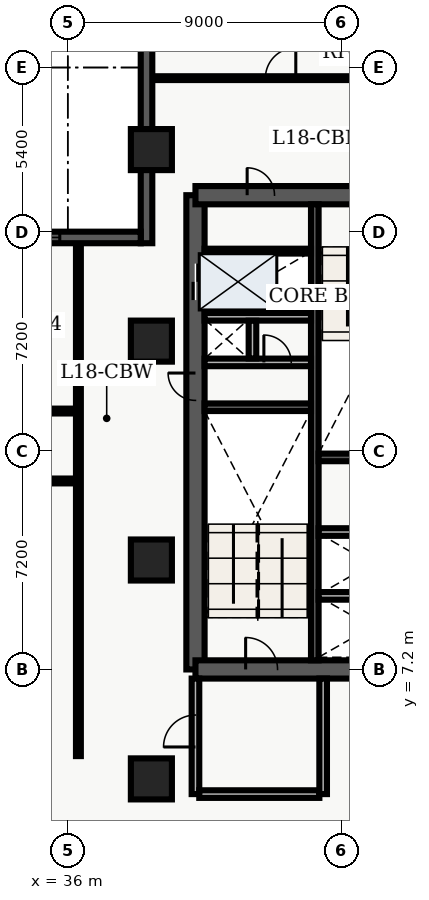
"""IFC4 building model, lengths in metres.
Left out: names, types, materials, properties, quantities, classifications, styles, units other than length and angle.
Written with IfcOpenShell. Run it as: python <this file> out.ifc"""

import sys

from ifc_helpers import new_model, entity, si_unit, converted_unit, direction, frame, origin_with_axes, origin_2d_with_axis, place, context, subcontext, project, spatial, polyline, rectangle, outline, extrude, element, fill, save


model = new_model("IFC4")
c1 = context("Model", 3, precision=1e-05, world=origin_with_axes(), true_north=direction((0.0, 1.0)))
c2 = subcontext(c1, "Body", "Model", "MODEL_VIEW")
j1 = project(units=[si_unit("LENGTHUNIT", "METRE"), converted_unit("PLANEANGLEUNIT", "DEGREE", entity("IfcPlaneAngleMeasure", 0.017), si_unit("PLANEANGLEUNIT", "RADIAN"), dimensions=[0, 0, 0, 0, 0, 0, 0])], contexts=[c1])
p1 = place(None, origin_with_axes())
s1 = spatial("IfcSite", under=j1, at=p1, CompositionType="ELEMENT")
p2 = place(p1, origin_with_axes())
s2 = spatial("IfcBuilding", under=s1, at=p2, CompositionType="ELEMENT")
p3 = place(p2, frame((0.0, 0.0, 75.6), z_axis=(0.0, 0.0, 1.0), x_axis=(1.0, 0.0, 0.0)))
s3 = spatial("IfcBuildingStorey", under=s2, at=p3, CompositionType="ELEMENT", Elevation=75.6)
p4 = place(p3, frame((40.2, 7.2, 0.0), z_axis=(0.0, 0.0, 1.0), x_axis=(0.0, 1.0, 0.0)))
e1 = element("IfcWall", 1, at=p4, inside=s3, PredefinedType="SHEAR", context=c2, shape_type="SweptSolid", body=[
    extrude(outline(polyline([(0.0, -0.3), (15.6, -0.3), (15.6, 0.3), (0.0, 0.3), (0.0, -0.3)])), origin_with_axes(), (0.0, 0.0, 1.0), 3.6),
])
p5 = place(p4, frame((12.75, 0.0, 0.0), z_axis=(0.0, 0.0, 1.0), x_axis=(1.0, 0.0, 0.0)))
e2 = element("IfcOpeningElement", 2, at=p5, cuts=e1, PredefinedType="OPENING", context=c2, shape_type="SweptSolid", body=[
    extrude(rectangle(XDim=1.2, YDim=0.62, at=origin_2d_with_axis()), origin_with_axes(), (0.0, 0.0, 1.0), 2.15),
])
p6 = place(p4, frame((9.3, 0.0, 0.0), z_axis=(0.0, 0.0, 1.0), x_axis=(1.0, 0.0, 0.0)))
e3 = element("IfcOpeningElement", 3, at=p6, cuts=e1, PredefinedType="OPENING", context=c2, shape_type="SweptSolid", body=[
    extrude(rectangle(XDim=0.9, YDim=0.62, at=origin_2d_with_axis()), origin_with_axes(), (0.0, 0.0, 1.0), 2.15),
])
p7 = place(p3, frame((40.2, 7.2, 0.0), z_axis=(0.0, 0.0, 1.0), x_axis=(1.0, 0.0, 0.0)))
e4 = element("IfcWall", 4, at=p7, inside=s3, PredefinedType="SHEAR", context=c2, shape_type="SweptSolid", body=[
    extrude(outline(polyline([(0.0, -0.3), (7.85, -0.3), (7.85, 0.3), (0.0, 0.3), (0.0, -0.3)])), origin_with_axes(), (0.0, 0.0, 1.0), 3.6),
])
p8 = place(p7, frame((2.175, 0.0, 0.0), z_axis=(0.0, 0.0, 1.0), x_axis=(1.0, 0.0, 0.0)))
e5 = element("IfcOpeningElement", 5, at=p8, cuts=e4, PredefinedType="OPENING", context=c2, shape_type="SweptSolid", body=[
    extrude(rectangle(XDim=1.05, YDim=0.62, at=origin_2d_with_axis()), origin_with_axes(), (0.0, 0.0, 1.0), 2.15),
])
p9 = place(p3, frame((40.2, 22.8, 0.0), z_axis=(0.0, 0.0, 1.0), x_axis=(1.0, 0.0, 0.0)))
e6 = element("IfcWall", 6, at=p9, inside=s3, PredefinedType="SHEAR", context=c2, shape_type="SweptSolid", body=[
    extrude(outline(polyline([(0.0, -0.3), (7.85, -0.3), (7.85, 0.3), (0.0, 0.3), (0.0, -0.3)])), origin_with_axes(), (0.0, 0.0, 1.0), 3.6),
])
p10 = place(p9, frame((5.775, 0.0, 0.0), z_axis=(0.0, 0.0, 1.0), x_axis=(1.0, 0.0, 0.0)))
e7 = element("IfcOpeningElement", 7, at=p10, cuts=e6, PredefinedType="OPENING", context=c2, shape_type="SweptSolid", body=[
    extrude(rectangle(XDim=1.05, YDim=0.62, at=origin_2d_with_axis()), origin_with_axes(), (0.0, 0.0, 1.0), 2.15),
])
p11 = place(p9, frame((2.15, 0.0, 0.0), z_axis=(0.0, 0.0, 1.0), x_axis=(1.0, 0.0, 0.0)))
e8 = element("IfcOpeningElement", 8, at=p11, cuts=e6, PredefinedType="OPENING", context=c2, shape_type="SweptSolid", body=[
    extrude(rectangle(XDim=0.9, YDim=0.62, at=origin_2d_with_axis()), origin_with_axes(), (0.0, 0.0, 1.0), 2.15),
])
p12 = place(p3, frame((44.125, 7.5, 0.0), z_axis=(0.0, 0.0, 1.0), x_axis=(0.0, 1.0, 0.0)))
e9 = element("IfcWall", 9, at=p12, inside=s3, PredefinedType="SHEAR", context=c2, shape_type="SweptSolid", body=[
    extrude(outline(polyline([(0.0, -0.125), (15.0, -0.125), (15.0, 0.125), (0.0, 0.125), (0.0, -0.125)])), origin_with_axes(), (0.0, 0.0, 1.0), 3.6),
])
for number, where, z_axis, x_axis in (
    (10, (40.5, 15.825, 0.0), (0.0, 0.0, 1.0), (1.0, 0.0, 0.0)),
    (11, (44.25, 14.175, 0.0), (0.0, 0.0, 1.0), (1.0, 0.0, 0.0)),
):
    element("IfcWall", number, at=place(p3, frame(where, z_axis=z_axis, x_axis=x_axis)), inside=s3, PredefinedType="SHEAR", context=c2, shape_type="SweptSolid", body=[
        extrude(outline(polyline([(0.0, -0.125), (3.5, -0.125), (3.5, 0.125), (0.0, 0.125), (0.0, -0.125)])), origin_with_axes(), (0.0, 0.0, 1.0), 3.6),
    ])
p13 = place(p3, frame((40.5, 17.3, 0.0), z_axis=(0.0, 0.0, 1.0), x_axis=(1.0, 0.0, 0.0)))
e12 = element("IfcWall", 12, at=p13, inside=s3, PredefinedType="SOLIDWALL", context=c2, shape_type="SweptSolid", body=[
    extrude(outline(polyline([(0.0, -0.125), (3.5, -0.125), (3.5, 0.125), (0.0, 0.125), (0.0, -0.125)])), origin_with_axes(), (0.0, 0.0, 1.0), 2.64),
])
p14 = place(p13, frame((2.4, 0.0, 0.0), z_axis=(0.0, 0.0, 1.0), x_axis=(1.0, 0.0, 0.0)))
e13 = element("IfcOpeningElement", 13, at=p14, cuts=e12, PredefinedType="OPENING", context=c2, shape_type="SweptSolid", body=[
    extrude(rectangle(XDim=0.9, YDim=0.27, at=origin_2d_with_axis()), origin_with_axes(), (0.0, 0.0, 1.0), 2.15),
])
p15 = place(p3, frame((40.5, 18.8, 0.0), z_axis=(0.0, 0.0, 1.0), x_axis=(1.0, 0.0, 0.0)))
e14 = element("IfcWall", 14, at=p15, inside=s3, PredefinedType="SOLIDWALL", context=c2, shape_type="SweptSolid", body=[
    extrude(outline(polyline([(0.0, -0.125), (3.5, -0.125), (3.5, 0.125), (0.0, 0.125), (0.0, -0.125)])), origin_with_axes(), (0.0, 0.0, 1.0), 2.64),
])
p16 = place(p3, frame((42.075, 17.43, 0.0), z_axis=(0.0, 0.0, 1.0), x_axis=(0.0, 1.0, 0.0)))
e15 = element("IfcWall", 15, at=p16, inside=s3, PredefinedType="SOLIDWALL", context=c2, shape_type="SweptSolid", body=[
    extrude(outline(polyline([(0.0, -0.125), (1.24, -0.125), (1.24, 0.125), (0.0, 0.125), (0.0, -0.125)])), origin_with_axes(), (0.0, 0.0, 1.0), 2.64),
])
p17 = place(p3, frame((40.2, 3.1, 0.0), z_axis=(0.0, 0.0, 1.0), x_axis=(0.0, 1.0, 0.0)))
e16 = element("IfcWall", 16, at=p17, inside=s3, PredefinedType="SOLIDWALL", context=c2, shape_type="SweptSolid", body=[
    extrude(outline(polyline([(0.0, -0.125), (3.8, -0.125), (3.8, 0.125), (0.0, 0.125), (0.0, -0.125)])), origin_with_axes(), (0.0, 0.0, 1.0), 2.64),
])
p18 = place(p17, frame((2.075, 0.0, 0.0), z_axis=(0.0, 0.0, 1.0), x_axis=(1.0, 0.0, 0.0)))
e17 = element("IfcOpeningElement", 17, at=p18, cuts=e16, PredefinedType="OPENING", context=c2, shape_type="SweptSolid", body=[
    extrude(rectangle(XDim=1.05, YDim=0.27, at=origin_2d_with_axis()), origin_with_axes(), (0.0, 0.0, 1.0), 2.15),
])
p19 = place(p3, frame((40.325, 3.1, 0.0), z_axis=(0.0, 0.0, 1.0), x_axis=(1.0, 0.0, 0.0)))
e18 = element("IfcWall", 18, at=p19, inside=s3, PredefinedType="SOLIDWALL", context=c2, shape_type="SweptSolid", body=[
    extrude(outline(polyline([(0.0, -0.125), (3.95, -0.125), (3.95, 0.125), (0.0, 0.125), (0.0, -0.125)])), origin_with_axes(), (0.0, 0.0, 1.0), 2.64),
])
p20 = place(p3, frame((44.4, 3.1, 0.0), z_axis=(0.0, 0.0, 1.0), x_axis=(0.0, 1.0, 0.0)))
e19 = element("IfcWall", 19, at=p20, inside=s3, PredefinedType="SOLIDWALL", context=c2, shape_type="SweptSolid", body=[
    extrude(outline(polyline([(0.0, -0.125), (3.8, -0.125), (3.8, 0.125), (0.0, 0.125), (0.0, -0.125)])), origin_with_axes(), (0.0, 0.0, 1.0), 2.64),
])
for number, where, z_axis, x_axis in (
    (20, (38.75, 3.6, 0.0), (0.0, 0.0, 1.0), (1.0, 0.0, 0.0)),
    (21, (38.75, 10.8, 0.0), (0.0, 0.0, 1.0), (1.0, 0.0, 0.0)),
    (22, (38.75, 18.0, 0.0), (0.0, 0.0, 1.0), (1.0, 0.0, 0.0)),
    (23, (38.75, 24.3, 0.0), (0.0, 0.0, 1.0), (1.0, 0.0, 0.0)),
):
    element("IfcColumn", number, at=place(p3, frame(where, z_axis=z_axis, x_axis=x_axis)), inside=s3, PredefinedType="COLUMN", context=c2, shape_type="SweptSolid", body=[
        extrude(rectangle(XDim=1.35, YDim=1.35, at=origin_2d_with_axis()), origin_with_axes(), (0.0, 0.0, 1.0), 3.9),
    ])
p21 = place(p3, frame((40.5, 20.96, 0.0), z_axis=(0.0, 0.0, 1.0), x_axis=(1.0, 0.0, 0.0)))
e24 = element("IfcWall", 24, at=p21, inside=s3, PredefinedType="PARTITIONING", context=c2, shape_type="SweptSolid", body=[
    extrude(outline(polyline([(0.0, -0.08), (3.5, -0.08), (3.5, 0.08), (0.0, 0.08), (0.0, -0.08)])), origin_with_axes(), (0.0, 0.0, 1.0), 2.64),
])
for number, where, z_axis, x_axis in (
    (25, (44.25, 9.62, 0.0), (0.0, 0.0, 1.0), (1.0, 0.0, 0.0)),
    (26, (44.25, 11.72, 0.0), (0.0, 0.0, 1.0), (1.0, 0.0, 0.0)),
):
    element("IfcWall", number, at=place(p3, frame(where, z_axis=z_axis, x_axis=x_axis)), inside=s3, PredefinedType="SOLIDWALL", context=c2, shape_type="SweptSolid", body=[
        extrude(outline(polyline([(0.0, -0.125), (3.5, -0.125), (3.5, 0.125), (0.0, 0.125), (0.0, -0.125)])), origin_with_axes(), (0.0, 0.0, 1.0), 2.64),
    ])
p22 = place(p3, frame((21.15, 13.4, 0.0), z_axis=(0.0, 0.0, 1.0), x_axis=(1.0, 0.0, 0.0)))
e27 = element("IfcWall", 27, at=p22, inside=s3, PredefinedType="PARTITIONING", context=c2, shape_type="SweptSolid", body=[
    extrude(outline(polyline([(0.0, -0.08), (15.2, -0.08), (15.2, 0.08), (0.0, 0.08), (0.0, -0.08)])), origin_with_axes(), (0.0, 0.0, 1.0), 2.64),
])
p23 = place(p22, frame((7.65, 0.0, 0.0), z_axis=(0.0, 0.0, 1.0), x_axis=(1.0, 0.0, 0.0)))
e28 = element("IfcOpeningElement", 28, at=p23, cuts=e27, PredefinedType="OPENING", context=c2, shape_type="SweptSolid", body=[
    extrude(rectangle(XDim=1.0, YDim=0.18, at=origin_2d_with_axis()), origin_with_axes(), (0.0, 0.0, 1.0), 2.15),
])
p24 = place(p3, frame((21.15, 15.7, 0.0), z_axis=(0.0, 0.0, 1.0), x_axis=(1.0, 0.0, 0.0)))
e29 = element("IfcWall", 29, at=p24, inside=s3, PredefinedType="PARTITIONING", context=c2, shape_type="SweptSolid", body=[
    extrude(outline(polyline([(0.0, -0.08), (15.2, -0.08), (15.2, 0.08), (0.0, 0.08), (0.0, -0.08)])), origin_with_axes(), (0.0, 0.0, 1.0), 2.64),
])
p25 = place(p24, frame((2.562, 0.0, 0.0), z_axis=(0.0, 0.0, 1.0), x_axis=(1.0, 0.0, 0.0)))
e30 = element("IfcOpeningElement", 30, at=p25, cuts=e29, PredefinedType="OPENING", context=c2, shape_type="SweptSolid", body=[
    extrude(rectangle(XDim=1.0, YDim=0.18, at=origin_2d_with_axis()), origin_with_axes(), (0.0, 0.0, 1.0), 2.15),
])
p26 = place(p24, frame((6.462, 0.0, 0.0), z_axis=(0.0, 0.0, 1.0), x_axis=(1.0, 0.0, 0.0)))
e31 = element("IfcOpeningElement", 31, at=p26, cuts=e29, PredefinedType="OPENING", context=c2, shape_type="SweptSolid", body=[
    extrude(rectangle(XDim=1.0, YDim=0.18, at=origin_2d_with_axis()), origin_with_axes(), (0.0, 0.0, 1.0), 2.15),
])
p27 = place(p24, frame((9.634, 0.0, 0.0), z_axis=(0.0, 0.0, 1.0), x_axis=(1.0, 0.0, 0.0)))
e32 = element("IfcOpeningElement", 32, at=p27, cuts=e29, PredefinedType="OPENING", context=c2, shape_type="SweptSolid", body=[
    extrude(rectangle(XDim=1.0, YDim=0.18, at=origin_2d_with_axis()), origin_with_axes(), (0.0, 0.0, 1.0), 2.15),
])
p28 = place(p24, frame((13.205, 0.0, 0.0), z_axis=(0.0, 0.0, 1.0), x_axis=(1.0, 0.0, 0.0)))
e33 = element("IfcOpeningElement", 33, at=p28, cuts=e29, PredefinedType="OPENING", context=c2, shape_type="SweptSolid", body=[
    extrude(rectangle(XDim=1.0, YDim=0.18, at=origin_2d_with_axis()), origin_with_axes(), (0.0, 0.0, 1.0), 2.15),
])
p29 = place(p3, frame((36.35, 4.35, 0.0), z_axis=(0.0, 0.0, 1.0), x_axis=(0.0, 1.0, 0.0)))
e34 = element("IfcWall", 34, at=p29, inside=s3, PredefinedType="PARTITIONING", context=c2, shape_type="SweptSolid", body=[
    extrude(outline(polyline([(0.0, -0.08), (16.95, -0.08), (16.95, 0.08), (0.0, 0.08), (0.0, -0.08)])), origin_with_axes(), (0.0, 0.0, 1.0), 2.64),
])
p30 = place(p3, frame((38.76, 26.65, 0.0), z_axis=(0.0, 0.0, 1.0), x_axis=(1.0, 0.0, 0.0)))
e35 = element("IfcWall", 35, at=p30, inside=s3, PredefinedType="PARTITIONING", context=c2, shape_type="SweptSolid", body=[
    extrude(outline(polyline([(0.0, -0.062), (20.88, -0.062), (20.88, 0.062), (0.0, 0.062), (0.0, -0.062)])), origin_with_axes(), (0.0, 0.0, 1.0), 2.64),
])
p31 = place(p30, frame((4.24, 0.0, 0.0), z_axis=(0.0, 0.0, 1.0), x_axis=(1.0, 0.0, 0.0)))
e36 = element("IfcOpeningElement", 36, at=p31, cuts=e35, PredefinedType="OPENING", context=c2, shape_type="SweptSolid", body=[
    extrude(rectangle(XDim=1.0, YDim=0.145, at=origin_2d_with_axis()), origin_with_axes(), (0.0, 0.0, 1.0), 2.15),
])
p32 = place(p3, frame((38.59, 21.22, 0.0), z_axis=(0.0, 0.0, 1.0), x_axis=(0.0, 1.0, 0.0)))
e37 = element("IfcWall", 37, at=p32, inside=s3, PredefinedType="SOLIDWALL", context=c2, shape_type="SweptSolid", body=[
    extrude(outline(polyline([(0.0, -0.19), (7.58, -0.19), (7.58, 0.19), (0.0, 0.19), (0.0, -0.19)])), origin_with_axes(), (0.0, 0.0, 1.0), 3.6),
])
p33 = place(p3, frame((21.22, 21.41, 0.0), z_axis=(0.0, 0.0, 1.0), x_axis=(1.0, 0.0, 0.0)))
e38 = element("IfcWall", 38, at=p33, inside=s3, PredefinedType="SOLIDWALL", context=c2, shape_type="SweptSolid", body=[
    extrude(outline(polyline([(0.0, -0.19), (17.18, -0.19), (17.18, 0.19), (0.0, 0.19), (0.0, -0.19)])), origin_with_axes(), (0.0, 0.0, 1.0), 3.6),
])
p34 = place(p33, frame((3.263, 0.0, 0.45), z_axis=(0.0, 0.0, 1.0), x_axis=(1.0, 0.0, 0.0)))
e39 = element("IfcOpeningElement", 39, at=p34, cuts=e38, PredefinedType="OPENING", context=c2, shape_type="SweptSolid", body=[
    extrude(rectangle(XDim=2.1, YDim=0.4, at=origin_2d_with_axis()), origin_with_axes(), (0.0, 0.0, 1.0), 2.2),
])
p35 = place(p33, frame((13.467, 0.0, 0.45), z_axis=(0.0, 0.0, 1.0), x_axis=(1.0, 0.0, 0.0)))
e40 = element("IfcOpeningElement", 40, at=p35, cuts=e38, PredefinedType="OPENING", context=c2, shape_type="SweptSolid", body=[
    extrude(rectangle(XDim=2.1, YDim=0.4, at=origin_2d_with_axis()), origin_with_axes(), (0.0, 0.0, 1.0), 2.2),
])
p36 = place(p4, frame((12.75, 0.0, 0.0), z_axis=(0.0, 0.0, 1.0), x_axis=(1.0, 0.0, 0.0)))
e41 = element("IfcDoor", 41, at=p36, inside=s3, OperationType="DOUBLE_DOOR_SLIDING", PredefinedType="DOOR", context=c2, shape_type="SweptSolid", body=[
    extrude(rectangle(XDim=1.2, YDim=0.09, at=origin_2d_with_axis()), origin_with_axes(), (0.0, 0.0, 1.0), 2.15),
])
fill(e2, e41)
p37 = place(p4, frame((9.3, 0.0, 0.0), z_axis=(0.0, 0.0, 1.0), x_axis=(1.0, 0.0, 0.0)))
e42 = element("IfcDoor", 42, at=p37, inside=s3, OperationType="SINGLE_SWING_RIGHT", PredefinedType="DOOR", context=c2, shape_type="SweptSolid", body=[
    extrude(rectangle(XDim=0.9, YDim=0.09, at=origin_2d_with_axis()), origin_with_axes(), (0.0, 0.0, 1.0), 2.15),
])
fill(e3, e42)
p38 = place(p13, frame((2.4, 0.0, 0.0), z_axis=(0.0, 0.0, 1.0), x_axis=(1.0, 0.0, 0.0)))
e43 = element("IfcDoor", 43, at=p38, inside=s3, OperationType="SINGLE_SWING_LEFT", PredefinedType="DOOR", context=c2, shape_type="SweptSolid", body=[
    extrude(rectangle(XDim=0.9, YDim=0.09, at=origin_2d_with_axis()), origin_with_axes(), (0.0, 0.0, 1.0), 2.15),
])
fill(e13, e43)
p39 = place(p7, frame((2.175, 0.0, 0.0), z_axis=(0.0, 0.0, 1.0), x_axis=(1.0, 0.0, 0.0)))
e44 = element("IfcDoor", 44, at=p39, inside=s3, OperationType="SINGLE_SWING_LEFT", PredefinedType="DOOR", context=c2, shape_type="SweptSolid", body=[
    extrude(rectangle(XDim=1.05, YDim=0.09, at=origin_2d_with_axis()), origin_with_axes(), (0.0, 0.0, 1.0), 2.15),
])
fill(e5, e44)
p40 = place(p17, frame((2.075, 0.0, 0.0), z_axis=(0.0, 0.0, 1.0), x_axis=(1.0, 0.0, 0.0)))
e45 = element("IfcDoor", 45, at=p40, inside=s3, OperationType="SINGLE_SWING_LEFT", PredefinedType="DOOR", context=c2, shape_type="SweptSolid", body=[
    extrude(rectangle(XDim=1.05, YDim=0.09, at=origin_2d_with_axis()), origin_with_axes(), (0.0, 0.0, 1.0), 2.15),
])
fill(e17, e45)
p41 = place(p9, frame((2.15, 0.0, 0.0), z_axis=(0.0, 0.0, 1.0), x_axis=(1.0, 0.0, 0.0)))
e46 = element("IfcDoor", 46, at=p41, inside=s3, OperationType="SINGLE_SWING_LEFT", PredefinedType="DOOR", context=c2, shape_type="SweptSolid", body=[
    extrude(rectangle(XDim=0.9, YDim=0.09, at=origin_2d_with_axis()), origin_with_axes(), (0.0, 0.0, 1.0), 2.15),
])
fill(e8, e46)
p42 = place(p30, frame((4.24, 0.0, 0.0), z_axis=(0.0, 0.0, 1.0), x_axis=(1.0, 0.0, 0.0)))
e47 = element("IfcDoor", 47, at=p42, inside=s3, OperationType="SINGLE_SWING_RIGHT", PredefinedType="DOOR", context=c2, shape_type="SweptSolid", body=[
    extrude(rectangle(XDim=1.0, YDim=0.075, at=origin_2d_with_axis()), origin_with_axes(), (0.0, 0.0, 1.0), 2.15),
])
fill(e36, e47)
p43 = place(p33, frame((13.467, 0.0, 0.45), z_axis=(0.0, 0.0, 1.0), x_axis=(1.0, 0.0, 0.0)))
e48 = element("IfcWindow", 48, at=p43, inside=s3, PredefinedType="WINDOW", context=c2, shape_type="SweptSolid", body=[
    extrude(rectangle(XDim=2.1, YDim=0.09, at=origin_2d_with_axis()), origin_with_axes(), (0.0, 0.0, 1.0), 2.2),
])
fill(e40, e48)
save(model, sys.argv[1])
